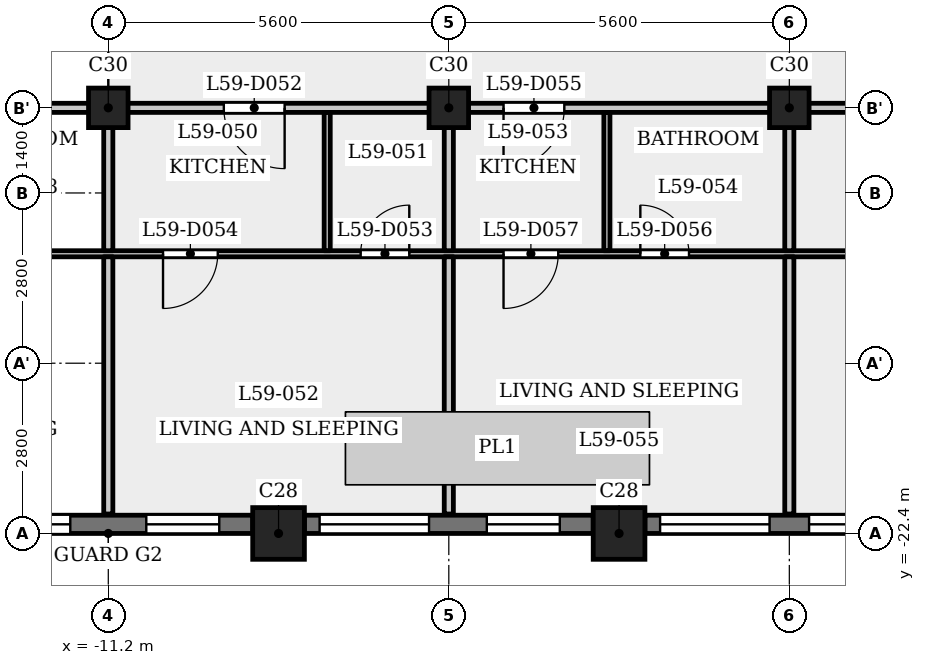
"""IFC4 building model, lengths in metres.
Left out: names, types, materials, properties, quantities, classifications, styles, units other than length and angle.
Written with IfcOpenShell. Run it as: python <this file> out.ifc"""

import sys

from ifc_helpers import new_model, si_unit, direction, frame, frame_2d, origin, origin_2d, place, context, subcontext, project, spatial, rectangle, extrude, element, fill, save


model = new_model("IFC4")
c1 = context("Model", 3, precision=1e-05, world=origin(), true_north=direction((0.0, 1.0)))
c2 = subcontext(c1, "Body", "Model", "MODEL_VIEW")
j1 = project(units=[si_unit("LENGTHUNIT", "METRE"), si_unit("PLANEANGLEUNIT", "RADIAN")], contexts=[c1])
p1 = place(None, origin())
s1 = spatial("IfcSite", under=j1, at=p1, CompositionType="ELEMENT")
p2 = place(p1, origin())
s2 = spatial("IfcBuilding", under=s1, at=p2, CompositionType="ELEMENT")
p3 = place(p2, frame((0.0, 0.0, 227.4)))
s3 = spatial("IfcBuildingStorey", under=s2, at=p3, CompositionType="ELEMENT", Elevation=227.4)
for number, where, z_axis, x_axis in (
    (1, (-8.4, -22.4, 0.0), (0.0, 0.0, 1.0), (1.0, 0.0, 0.0)),
    (2, (-2.8, -22.4, 0.0), (0.0, 0.0, 1.0), (1.0, 0.0, 0.0)),
):
    element("IfcColumn", number, at=place(p3, frame(where, z_axis=z_axis, x_axis=x_axis)), inside=s3, PredefinedType="COLUMN", context=c2, shape_type="SweptSolid", body=[
        extrude(rectangle(XDim=0.85, YDim=0.85, at=origin_2d()), origin(), (0.0, 0.0, 1.0), 3.5),
    ])
for number, where, z_axis, x_axis in (
    (3, (-11.2, -15.4, 0.0), (0.0, 0.0, 1.0), (1.0, 0.0, 0.0)),
    (4, (-5.6, -15.4, 0.0), (0.0, 0.0, 1.0), (1.0, 0.0, 0.0)),
    (5, (0.0, -15.4, 0.0), (0.0, 0.0, 1.0), (1.0, 0.0, 0.0)),
):
    element("IfcColumn", number, at=place(p3, frame(where, z_axis=z_axis, x_axis=x_axis)), inside=s3, PredefinedType="COLUMN", context=c2, shape_type="SweptSolid", body=[
        extrude(rectangle(XDim=0.65, YDim=0.65, at=origin_2d()), origin(), (0.0, 0.0, 1.0), 3.5),
    ])
p4 = place(p3, frame((-13.575, -22.25, 0.0), z_axis=(0.0, 0.0, 1.0), x_axis=(1.0, 0.0, 0.0)))
e6 = element("IfcWall", 6, at=p4, inside=s3, PredefinedType="SOLIDWALL", context=c2, shape_type="SweptSolid", body=[
    extrude(rectangle(XDim=4.75, YDim=0.3, at=frame_2d((2.375, 0.0))), origin(), (0.0, 0.0, 1.0), 2.45),
])
p5 = place(p4, frame((0.55, 0.0, 0.6)))
e7 = element("IfcOpeningElement", 7, at=p5, cuts=e6, PredefinedType="OPENING", context=c2, shape_type="SweptSolid", body=[
    extrude(rectangle(XDim=1.2, YDim=1.55, at=frame_2d((0.6, 0.775))), frame((0.0, 0.16, 0.0), z_axis=(0.0, -1.0, 0.0), x_axis=(1.0, 0.0, 0.0)), (0.0, 0.0, 1.0), 0.32),
])
p6 = place(p4, frame((3.0, 0.0, 0.6)))
e8 = element("IfcOpeningElement", 8, at=p6, cuts=e6, PredefinedType="OPENING", context=c2, shape_type="SweptSolid", body=[
    extrude(rectangle(XDim=1.2, YDim=1.55, at=frame_2d((0.6, 0.775))), frame((0.0, 0.16, 0.0), z_axis=(0.0, -1.0, 0.0), x_axis=(1.0, 0.0, 0.0)), (0.0, 0.0, 1.0), 0.32),
])
p7 = place(p3, frame((-7.975, -22.25, 0.0), z_axis=(0.0, 0.0, 1.0), x_axis=(1.0, 0.0, 0.0)))
e9 = element("IfcWall", 9, at=p7, inside=s3, PredefinedType="SOLIDWALL", context=c2, shape_type="SweptSolid", body=[
    extrude(rectangle(XDim=4.75, YDim=0.3, at=frame_2d((2.375, 0.0))), origin(), (0.0, 0.0, 1.0), 2.45),
])
p8 = place(p7, frame((0.25, 0.0, 0.9)))
e10 = element("IfcOpeningElement", 10, at=p8, cuts=e9, PredefinedType="OPENING", context=c2, shape_type="SweptSolid", body=[
    extrude(rectangle(XDim=1.8, YDim=1.25, at=frame_2d((0.9, 0.625))), frame((0.0, 0.16, 0.0), z_axis=(0.0, -1.0, 0.0), x_axis=(1.0, 0.0, 0.0)), (0.0, 0.0, 1.0), 0.32),
])
p9 = place(p7, frame((3.0, 0.0, 0.6)))
e11 = element("IfcOpeningElement", 11, at=p9, cuts=e9, PredefinedType="OPENING", context=c2, shape_type="SweptSolid", body=[
    extrude(rectangle(XDim=1.2, YDim=1.55, at=frame_2d((0.6, 0.775))), frame((0.0, 0.16, 0.0), z_axis=(0.0, -1.0, 0.0), x_axis=(1.0, 0.0, 0.0)), (0.0, 0.0, 1.0), 0.32),
])
p10 = place(p3, frame((-2.375, -22.25, 0.0), z_axis=(0.0, 0.0, 1.0), x_axis=(1.0, 0.0, 0.0)))
e12 = element("IfcWall", 12, at=p10, inside=s3, PredefinedType="SOLIDWALL", context=c2, shape_type="SweptSolid", body=[
    extrude(rectangle(XDim=4.75, YDim=0.3, at=frame_2d((2.375, 0.0))), origin(), (0.0, 0.0, 1.0), 2.45),
])
p11 = place(p10, frame((0.25, 0.0, 0.9)))
e13 = element("IfcOpeningElement", 13, at=p11, cuts=e12, PredefinedType="OPENING", context=c2, shape_type="SweptSolid", body=[
    extrude(rectangle(XDim=1.8, YDim=1.25, at=frame_2d((0.9, 0.625))), frame((0.0, 0.16, 0.0), z_axis=(0.0, -1.0, 0.0), x_axis=(1.0, 0.0, 0.0)), (0.0, 0.0, 1.0), 0.32),
])
p12 = place(p10, frame((2.7, 0.0, 0.9)))
e14 = element("IfcOpeningElement", 14, at=p12, cuts=e12, PredefinedType="OPENING", context=c2, shape_type="SweptSolid", body=[
    extrude(rectangle(XDim=1.8, YDim=1.25, at=frame_2d((0.9, 0.625))), frame((0.0, 0.16, 0.0), z_axis=(0.0, -1.0, 0.0), x_axis=(1.0, 0.0, 0.0)), (0.0, 0.0, 1.0), 0.32),
])
p13 = place(p3, frame((-23.594, -17.8, 0.0), z_axis=(0.0, 0.0, 1.0), x_axis=(1.0, 0.0, 0.0)))
e15 = element("IfcWall", 15, at=p13, inside=s3, PredefinedType="PARTITIONING", context=c2, shape_type="SweptSolid", body=[
    extrude(rectangle(XDim=47.188, YDim=0.1, at=frame_2d((23.594, 0.0))), origin(), (0.0, 0.0, 1.0), 3.15),
])
p14 = place(p13, frame((5.094, 0.0, 0.0)))
e16 = element("IfcOpeningElement", 16, at=p14, cuts=e15, PredefinedType="OPENING", context=c2, shape_type="SweptSolid", body=[
    extrude(rectangle(XDim=0.8, YDim=2.1, at=frame_2d((0.4, 1.05))), frame((0.0, 0.06, 0.0), z_axis=(0.0, -1.0, 0.0), x_axis=(1.0, 0.0, 0.0)), (0.0, 0.0, 1.0), 0.12),
])
p15 = place(p13, frame((1.126, 0.0, 0.0)))
e17 = element("IfcOpeningElement", 17, at=p15, cuts=e15, PredefinedType="OPENING", context=c2, shape_type="SweptSolid", body=[
    extrude(rectangle(XDim=0.9, YDim=2.1, at=frame_2d((0.45, 1.05))), frame((0.0, 0.06, 0.0), z_axis=(0.0, -1.0, 0.0), x_axis=(1.0, 0.0, 0.0)), (0.0, 0.0, 1.0), 0.12),
])
p16 = place(p13, frame((9.944, 0.0, 0.0)))
e18 = element("IfcOpeningElement", 18, at=p16, cuts=e15, PredefinedType="OPENING", context=c2, shape_type="SweptSolid", body=[
    extrude(rectangle(XDim=0.8, YDim=2.1, at=frame_2d((0.4, 1.05))), frame((0.0, 0.06, 0.0), z_axis=(0.0, -1.0, 0.0), x_axis=(1.0, 0.0, 0.0)), (0.0, 0.0, 1.0), 0.12),
])
p17 = place(p13, frame((7.444, 0.0, 0.0)))
e19 = element("IfcOpeningElement", 19, at=p17, cuts=e15, PredefinedType="OPENING", context=c2, shape_type="SweptSolid", body=[
    extrude(rectangle(XDim=0.9, YDim=2.1, at=frame_2d((0.45, 1.05))), frame((0.0, 0.06, 0.0), z_axis=(0.0, -1.0, 0.0), x_axis=(1.0, 0.0, 0.0)), (0.0, 0.0, 1.0), 0.12),
])
p18 = place(p13, frame((16.544, 0.0, 0.0)))
e20 = element("IfcOpeningElement", 20, at=p18, cuts=e15, PredefinedType="OPENING", context=c2, shape_type="SweptSolid", body=[
    extrude(rectangle(XDim=0.8, YDim=2.1, at=frame_2d((0.4, 1.05))), frame((0.0, 0.06, 0.0), z_axis=(0.0, -1.0, 0.0), x_axis=(1.0, 0.0, 0.0)), (0.0, 0.0, 1.0), 0.12),
])
p19 = place(p13, frame((13.294, 0.0, 0.0)))
e21 = element("IfcOpeningElement", 21, at=p19, cuts=e15, PredefinedType="OPENING", context=c2, shape_type="SweptSolid", body=[
    extrude(rectangle(XDim=0.9, YDim=2.1, at=frame_2d((0.45, 1.05))), frame((0.0, 0.06, 0.0), z_axis=(0.0, -1.0, 0.0), x_axis=(1.0, 0.0, 0.0)), (0.0, 0.0, 1.0), 0.12),
])
p20 = place(p13, frame((21.144, 0.0, 0.0)))
e22 = element("IfcOpeningElement", 22, at=p20, cuts=e15, PredefinedType="OPENING", context=c2, shape_type="SweptSolid", body=[
    extrude(rectangle(XDim=0.8, YDim=2.1, at=frame_2d((0.4, 1.05))), frame((0.0, 0.06, 0.0), z_axis=(0.0, -1.0, 0.0), x_axis=(1.0, 0.0, 0.0)), (0.0, 0.0, 1.0), 0.12),
])
p21 = place(p13, frame((18.894, 0.0, 0.0)))
e23 = element("IfcOpeningElement", 23, at=p21, cuts=e15, PredefinedType="OPENING", context=c2, shape_type="SweptSolid", body=[
    extrude(rectangle(XDim=0.9, YDim=2.1, at=frame_2d((0.45, 1.05))), frame((0.0, 0.06, 0.0), z_axis=(0.0, -1.0, 0.0), x_axis=(1.0, 0.0, 0.0)), (0.0, 0.0, 1.0), 0.12),
])
p22 = place(p13, frame((35.944, 0.0, 0.0)))
e24 = element("IfcOpeningElement", 24, at=p22, cuts=e15, PredefinedType="OPENING", context=c2, shape_type="SweptSolid", body=[
    extrude(rectangle(XDim=0.9, YDim=2.1, at=frame_2d((0.45, 1.05))), frame((0.0, 0.06, 0.0), z_axis=(0.0, -1.0, 0.0), x_axis=(1.0, 0.0, 0.0)), (0.0, 0.0, 1.0), 0.12),
])
p23 = place(p13, frame((32.594, 0.0, 0.0)))
e25 = element("IfcOpeningElement", 25, at=p23, cuts=e15, PredefinedType="OPENING", context=c2, shape_type="SweptSolid", body=[
    extrude(rectangle(XDim=0.9, YDim=2.1, at=frame_2d((0.45, 1.05))), frame((0.0, 0.06, 0.0), z_axis=(0.0, -1.0, 0.0), x_axis=(1.0, 0.0, 0.0)), (0.0, 0.0, 1.0), 0.12),
])
p24 = place(p13, frame((40.944, 0.0, 0.0)))
e26 = element("IfcOpeningElement", 26, at=p24, cuts=e15, PredefinedType="OPENING", context=c2, shape_type="SweptSolid", body=[
    extrude(rectangle(XDim=0.8, YDim=2.1, at=frame_2d((0.4, 1.05))), frame((0.0, 0.06, 0.0), z_axis=(0.0, -1.0, 0.0), x_axis=(1.0, 0.0, 0.0)), (0.0, 0.0, 1.0), 0.12),
])
p25 = place(p13, frame((45.444, 0.0, 0.0)))
e27 = element("IfcOpeningElement", 27, at=p25, cuts=e15, PredefinedType="OPENING", context=c2, shape_type="SweptSolid", body=[
    extrude(rectangle(XDim=0.9, YDim=2.1, at=frame_2d((0.45, 1.05))), frame((0.0, 0.06, 0.0), z_axis=(0.0, -1.0, 0.0), x_axis=(1.0, 0.0, 0.0)), (0.0, 0.0, 1.0), 0.12),
])
p26 = place(p3, frame((-24.684, -15.4, 0.0), z_axis=(0.0, 0.0, 1.0), x_axis=(1.0, 0.0, 0.0)))
e28 = element("IfcWall", 28, at=p26, inside=s3, PredefinedType="PARTITIONING", context=c2, shape_type="SweptSolid", body=[
    extrude(rectangle(XDim=49.368, YDim=0.15, at=frame_2d((24.684, 0.0))), origin(), (0.0, 0.0, 1.0), 3.15),
])
p27 = place(p26, frame((1.143, 0.0, 0.0)))
e29 = element("IfcOpeningElement", 29, at=p27, cuts=e28, PredefinedType="OPENING", context=c2, shape_type="SweptSolid", body=[
    extrude(rectangle(XDim=1.0, YDim=2.1, at=frame_2d((0.5, 1.05))), frame((0.0, 0.085, 0.0), z_axis=(0.0, -1.0, 0.0), x_axis=(1.0, 0.0, 0.0)), (0.0, 0.0, 1.0), 0.17),
])
p28 = place(p26, frame((8.534, 0.0, 0.0)))
e30 = element("IfcOpeningElement", 30, at=p28, cuts=e28, PredefinedType="OPENING", context=c2, shape_type="SweptSolid", body=[
    extrude(rectangle(XDim=1.0, YDim=2.1, at=frame_2d((0.5, 1.05))), frame((0.0, 0.085, 0.0), z_axis=(0.0, -1.0, 0.0), x_axis=(1.0, 0.0, 0.0)), (0.0, 0.0, 1.0), 0.17),
])
p29 = place(p26, frame((15.384, 0.0, 0.0)))
e31 = element("IfcOpeningElement", 31, at=p29, cuts=e28, PredefinedType="OPENING", context=c2, shape_type="SweptSolid", body=[
    extrude(rectangle(XDim=1.0, YDim=2.1, at=frame_2d((0.5, 1.05))), frame((0.0, 0.085, 0.0), z_axis=(0.0, -1.0, 0.0), x_axis=(1.0, 0.0, 0.0)), (0.0, 0.0, 1.0), 0.17),
])
p30 = place(p26, frame((19.984, 0.0, 0.0)))
e32 = element("IfcOpeningElement", 32, at=p30, cuts=e28, PredefinedType="OPENING", context=c2, shape_type="SweptSolid", body=[
    extrude(rectangle(XDim=1.0, YDim=2.1, at=frame_2d((0.5, 1.05))), frame((0.0, 0.085, 0.0), z_axis=(0.0, -1.0, 0.0), x_axis=(1.0, 0.0, 0.0)), (0.0, 0.0, 1.0), 0.17),
])
p31 = place(p26, frame((39.784, 0.0, 0.0)))
e33 = element("IfcOpeningElement", 33, at=p31, cuts=e28, PredefinedType="OPENING", context=c2, shape_type="SweptSolid", body=[
    extrude(rectangle(XDim=1.0, YDim=2.1, at=frame_2d((0.5, 1.05))), frame((0.0, 0.085, 0.0), z_axis=(0.0, -1.0, 0.0), x_axis=(1.0, 0.0, 0.0)), (0.0, 0.0, 1.0), 0.17),
])
p32 = place(p26, frame((47.384, 0.0, 0.0)))
e34 = element("IfcOpeningElement", 34, at=p32, cuts=e28, PredefinedType="OPENING", context=c2, shape_type="SweptSolid", body=[
    extrude(rectangle(XDim=1.0, YDim=2.1, at=frame_2d((0.5, 1.05))), frame((0.0, 0.085, 0.0), z_axis=(0.0, -1.0, 0.0), x_axis=(1.0, 0.0, 0.0)), (0.0, 0.0, 1.0), 0.17),
])
p33 = place(p3, frame((-11.2, -22.08, 0.0), z_axis=(0.0, 0.0, 1.0), x_axis=(0.0, 1.0, 0.0)))
e35 = element("IfcWall", 35, at=p33, inside=s3, PredefinedType="PARTITIONING", context=c2, shape_type="SweptSolid", body=[
    extrude(rectangle(XDim=4.23, YDim=0.15, at=frame_2d((2.115, 0.0))), origin(), (0.0, 0.0, 1.0), 3.15),
])
p34 = place(p3, frame((-11.2, -17.75, 0.0), z_axis=(0.0, 0.0, 1.0), x_axis=(0.0, 1.0, 0.0)))
e36 = element("IfcWall", 36, at=p34, inside=s3, PredefinedType="PARTITIONING", context=c2, shape_type="SweptSolid", body=[
    extrude(rectangle(XDim=2.275, YDim=0.15, at=frame_2d((1.137, 0.0))), origin(), (0.0, 0.0, 1.0), 3.15),
])
p35 = place(p3, frame((-7.6, -17.75, 0.0), z_axis=(0.0, 0.0, 1.0), x_axis=(0.0, 1.0, 0.0)))
e37 = element("IfcWall", 37, at=p35, inside=s3, PredefinedType="PARTITIONING", context=c2, shape_type="SweptSolid", body=[
    extrude(rectangle(XDim=2.275, YDim=0.1, at=frame_2d((1.137, 0.0))), origin(), (0.0, 0.0, 1.0), 3.15),
])
p36 = place(p3, frame((-5.6, -22.08, 0.0), z_axis=(0.0, 0.0, 1.0), x_axis=(0.0, 1.0, 0.0)))
e38 = element("IfcWall", 38, at=p36, inside=s3, PredefinedType="PARTITIONING", context=c2, shape_type="SweptSolid", body=[
    extrude(rectangle(XDim=4.23, YDim=0.15, at=frame_2d((2.115, 0.0))), origin(), (0.0, 0.0, 1.0), 3.15),
])
p37 = place(p3, frame((-5.6, -17.75, 0.0), z_axis=(0.0, 0.0, 1.0), x_axis=(0.0, 1.0, 0.0)))
e39 = element("IfcWall", 39, at=p37, inside=s3, PredefinedType="PARTITIONING", context=c2, shape_type="SweptSolid", body=[
    extrude(rectangle(XDim=2.275, YDim=0.15, at=frame_2d((1.137, 0.0))), origin(), (0.0, 0.0, 1.0), 3.15),
])
p38 = place(p3, frame((-3.0, -17.75, 0.0), z_axis=(0.0, 0.0, 1.0), x_axis=(0.0, 1.0, 0.0)))
e40 = element("IfcWall", 40, at=p38, inside=s3, PredefinedType="PARTITIONING", context=c2, shape_type="SweptSolid", body=[
    extrude(rectangle(XDim=2.275, YDim=0.1, at=frame_2d((1.137, 0.0))), origin(), (0.0, 0.0, 1.0), 3.15),
])
p39 = place(p3, frame((0.0, -22.08, 0.0), z_axis=(0.0, 0.0, 1.0), x_axis=(0.0, 1.0, 0.0)))
e41 = element("IfcWall", 41, at=p39, inside=s3, PredefinedType="PARTITIONING", context=c2, shape_type="SweptSolid", body=[
    extrude(rectangle(XDim=4.23, YDim=0.15, at=frame_2d((2.115, 0.0))), origin(), (0.0, 0.0, 1.0), 3.15),
])
p40 = place(p3, frame((0.0, -17.75, 0.0), z_axis=(0.0, 0.0, 1.0), x_axis=(0.0, 1.0, 0.0)))
e42 = element("IfcWall", 42, at=p40, inside=s3, PredefinedType="PARTITIONING", context=c2, shape_type="SweptSolid", body=[
    extrude(rectangle(XDim=2.275, YDim=0.15, at=frame_2d((1.137, 0.0))), origin(), (0.0, 0.0, 1.0), 3.15),
])
p41 = place(p29, origin())
e43 = element("IfcDoor", 43, at=p41, inside=s3, OperationType="SINGLE_SWING_RIGHT", PredefinedType="DOOR", context=c2, shape_type="SweptSolid", body=[
    extrude(rectangle(XDim=1.0, YDim=2.1, at=frame_2d((0.5, 1.05))), frame((0.0, 0.025, 0.0), z_axis=(0.0, -1.0, 0.0), x_axis=(1.0, 0.0, 0.0)), (0.0, 0.0, 1.0), 0.05),
])
fill(e31, e43)
p42 = place(p18, origin())
e44 = element("IfcDoor", 44, at=p42, inside=s3, OperationType="SINGLE_SWING_LEFT", PredefinedType="DOOR", context=c2, shape_type="SweptSolid", body=[
    extrude(rectangle(XDim=0.8, YDim=2.1, at=frame_2d((0.4, 1.05))), frame((0.0, 0.025, 0.0), z_axis=(0.0, -1.0, 0.0), x_axis=(1.0, 0.0, 0.0)), (0.0, 0.0, 1.0), 0.05),
])
fill(e20, e44)
p43 = place(p19, origin())
e45 = element("IfcDoor", 45, at=p43, inside=s3, OperationType="SINGLE_SWING_LEFT", PredefinedType="DOOR", context=c2, shape_type="SweptSolid", body=[
    extrude(rectangle(XDim=0.9, YDim=2.1, at=frame_2d((0.45, 1.05))), frame((0.0, 0.025, 0.0), z_axis=(0.0, -1.0, 0.0), x_axis=(1.0, 0.0, 0.0)), (0.0, 0.0, 1.0), 0.05),
])
fill(e21, e45)
p44 = place(p30, origin())
e46 = element("IfcDoor", 46, at=p44, inside=s3, OperationType="SINGLE_SWING_LEFT", PredefinedType="DOOR", context=c2, shape_type="SweptSolid", body=[
    extrude(rectangle(XDim=1.0, YDim=2.1, at=frame_2d((0.5, 1.05))), frame((0.0, 0.025, 0.0), z_axis=(0.0, -1.0, 0.0), x_axis=(1.0, 0.0, 0.0)), (0.0, 0.0, 1.0), 0.05),
])
fill(e32, e46)
p45 = place(p20, origin())
e47 = element("IfcDoor", 47, at=p45, inside=s3, OperationType="SINGLE_SWING_RIGHT", PredefinedType="DOOR", context=c2, shape_type="SweptSolid", body=[
    extrude(rectangle(XDim=0.8, YDim=2.1, at=frame_2d((0.4, 1.05))), frame((0.0, 0.025, 0.0), z_axis=(0.0, -1.0, 0.0), x_axis=(1.0, 0.0, 0.0)), (0.0, 0.0, 1.0), 0.05),
])
fill(e22, e47)
p46 = place(p21, origin())
e48 = element("IfcDoor", 48, at=p46, inside=s3, OperationType="SINGLE_SWING_LEFT", PredefinedType="DOOR", context=c2, shape_type="SweptSolid", body=[
    extrude(rectangle(XDim=0.9, YDim=2.1, at=frame_2d((0.45, 1.05))), frame((0.0, 0.025, 0.0), z_axis=(0.0, -1.0, 0.0), x_axis=(1.0, 0.0, 0.0)), (0.0, 0.0, 1.0), 0.05),
])
fill(e23, e48)
p47 = place(p5, origin())
e49 = element("IfcWindow", 49, at=p47, inside=s3, PartitioningType="SINGLE_PANEL", PredefinedType="WINDOW", context=c2, shape_type="SweptSolid", body=[
    extrude(rectangle(XDim=1.2, YDim=1.55, at=frame_2d((0.6, 0.775))), frame((0.0, 0.03, 0.0), z_axis=(0.0, -1.0, 0.0), x_axis=(1.0, 0.0, 0.0)), (0.0, 0.0, 1.0), 0.06),
])
fill(e7, e49)
p48 = place(p6, origin())
e50 = element("IfcWindow", 50, at=p48, inside=s3, PartitioningType="SINGLE_PANEL", PredefinedType="WINDOW", context=c2, shape_type="SweptSolid", body=[
    extrude(rectangle(XDim=1.2, YDim=1.55, at=frame_2d((0.6, 0.775))), frame((0.0, 0.03, 0.0), z_axis=(0.0, -1.0, 0.0), x_axis=(1.0, 0.0, 0.0)), (0.0, 0.0, 1.0), 0.06),
])
fill(e8, e50)
p49 = place(p8, origin())
e51 = element("IfcWindow", 51, at=p49, inside=s3, PartitioningType="SINGLE_PANEL", PredefinedType="WINDOW", context=c2, shape_type="SweptSolid", body=[
    extrude(rectangle(XDim=1.8, YDim=1.25, at=frame_2d((0.9, 0.625))), frame((0.0, 0.03, 0.0), z_axis=(0.0, -1.0, 0.0), x_axis=(1.0, 0.0, 0.0)), (0.0, 0.0, 1.0), 0.06),
])
fill(e10, e51)
p50 = place(p9, origin())
e52 = element("IfcWindow", 52, at=p50, inside=s3, PartitioningType="SINGLE_PANEL", PredefinedType="WINDOW", context=c2, shape_type="SweptSolid", body=[
    extrude(rectangle(XDim=1.2, YDim=1.55, at=frame_2d((0.6, 0.775))), frame((0.0, 0.03, 0.0), z_axis=(0.0, -1.0, 0.0), x_axis=(1.0, 0.0, 0.0)), (0.0, 0.0, 1.0), 0.06),
])
fill(e11, e52)
p51 = place(p11, origin())
e53 = element("IfcWindow", 53, at=p51, inside=s3, PartitioningType="SINGLE_PANEL", PredefinedType="WINDOW", context=c2, shape_type="SweptSolid", body=[
    extrude(rectangle(XDim=1.8, YDim=1.25, at=frame_2d((0.9, 0.625))), frame((0.0, 0.03, 0.0), z_axis=(0.0, -1.0, 0.0), x_axis=(1.0, 0.0, 0.0)), (0.0, 0.0, 1.0), 0.06),
])
fill(e13, e53)
p52 = place(p12, origin())
e54 = element("IfcWindow", 54, at=p52, inside=s3, PartitioningType="SINGLE_PANEL", PredefinedType="WINDOW", context=c2, shape_type="SweptSolid", body=[
    extrude(rectangle(XDim=1.8, YDim=1.25, at=frame_2d((0.9, 0.625))), frame((0.0, 0.03, 0.0), z_axis=(0.0, -1.0, 0.0), x_axis=(1.0, 0.0, 0.0)), (0.0, 0.0, 1.0), 0.06),
])
fill(e14, e54)
save(model, sys.argv[1])
